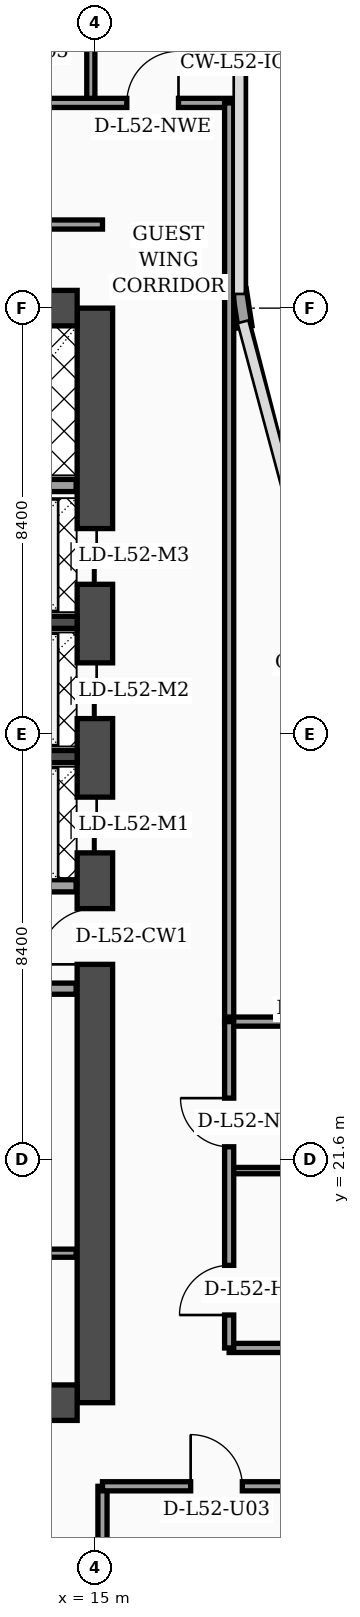
"""IFC4 building model, lengths in metres.
Left out: names, types, materials, properties, quantities, classifications, styles, units other than length and angle.
Written with IfcOpenShell. Run it as: python <this file> out.ifc"""

import sys

from ifc_helpers import new_model, si_unit, direction, frame, frame_2d, origin, place, context, subcontext, project, spatial, rectangle, extrude, element, fill, save


model = new_model("IFC4")
c1 = context("Model", 3, precision=1e-05, world=origin(), true_north=direction((0.0, 1.0)))
c2 = subcontext(c1, "Body", "Model", "MODEL_VIEW")
j1 = project(units=[si_unit("LENGTHUNIT", "METRE"), si_unit("PLANEANGLEUNIT", "RADIAN")], contexts=[c1])
p1 = place(None, origin())
s1 = spatial("IfcSite", under=j1, at=p1, CompositionType="ELEMENT")
p2 = place(p1, origin())
s2 = spatial("IfcBuilding", under=s1, at=p2, CompositionType="ELEMENT")
p3 = place(p2, frame((0.0, 0.0, 211.0)))
s3 = spatial("IfcBuildingStorey", under=s2, at=p3, CompositionType="ELEMENT", Elevation=211.0)
p4 = place(p3, frame((15.0, 16.8, 0.0), z_axis=(0.0, 0.0, 1.0), x_axis=(0.0, 1.0, 0.0)))
e1 = element("IfcWall", 1, at=p4, inside=s3, PredefinedType="SHEAR", context=c2, shape_type="SweptSolid", body=[
    extrude(rectangle(XDim=21.6, YDim=0.7, at=frame_2d((10.8, 0.0))), origin(), (0.0, 0.0, 1.0), 3.56),
])
p5 = place(p4, frame((8.65, 0.0, 0.0)))
e2 = element("IfcOpeningElement", 2, at=p5, cuts=e1, PredefinedType="OPENING", context=c2, shape_type="SweptSolid", body=[
    extrude(rectangle(XDim=1.1, YDim=2.2, at=frame_2d((0.55, 1.1))), frame((0.0, 0.36, 0.0), z_axis=(0.0, -1.0, 0.0), x_axis=(1.0, 0.0, 0.0)), (0.0, 0.0, 1.0), 0.72),
])
p6 = place(p4, frame((10.85, 0.0, 0.0)))
e3 = element("IfcOpeningElement", 3, at=p6, cuts=e1, PredefinedType="OPENING", context=c2, shape_type="SweptSolid", body=[
    extrude(rectangle(XDim=1.1, YDim=2.2, at=frame_2d((0.55, 1.1))), frame((0.0, 0.36, 0.0), z_axis=(0.0, -1.0, 0.0), x_axis=(1.0, 0.0, 0.0)), (0.0, 0.0, 1.0), 0.72),
])
p7 = place(p4, frame((13.5, 0.0, 0.0)))
e4 = element("IfcOpeningElement", 4, at=p7, cuts=e1, PredefinedType="OPENING", context=c2, shape_type="SweptSolid", body=[
    extrude(rectangle(XDim=1.1, YDim=2.2, at=frame_2d((0.55, 1.1))), frame((0.0, 0.36, 0.0), z_axis=(0.0, -1.0, 0.0), x_axis=(1.0, 0.0, 0.0)), (0.0, 0.0, 1.0), 0.72),
])
p8 = place(p4, frame((16.15, 0.0, 0.0)))
e5 = element("IfcOpeningElement", 5, at=p8, cuts=e1, PredefinedType="OPENING", context=c2, shape_type="SweptSolid", body=[
    extrude(rectangle(XDim=1.1, YDim=2.2, at=frame_2d((0.55, 1.1))), frame((0.0, 0.36, 0.0), z_axis=(0.0, -1.0, 0.0), x_axis=(1.0, 0.0, 0.0)), (0.0, 0.0, 1.0), 0.72),
])
for number, where, z_axis, x_axis in (
    (6, (4.55, 38.4, 0.0), (0.0, 0.0, 1.0), (1.0, 0.0, 0.0)),
    (7, (4.55, 16.8, 0.0), (0.0, 0.0, 1.0), (1.0, 0.0, 0.0)),
):
    element("IfcWall", number, at=place(p3, frame(where, z_axis=z_axis, x_axis=x_axis)), inside=s3, PredefinedType="SHEAR", context=c2, shape_type="SweptSolid", body=[
        extrude(rectangle(XDim=10.1, YDim=0.7, at=frame_2d((5.05, 0.0))), origin(), (0.0, 0.0, 1.0), 3.56),
    ])
for number, where, z_axis, x_axis in (
    (8, (12.18, 29.55, 0.0), (0.0, 0.0, 1.0), (1.0, 0.0, 0.0)),
    (9, (12.18, 32.2, 0.0), (0.0, 0.0, 1.0), (1.0, 0.0, 0.0)),
):
    element("IfcWall", number, at=place(p3, frame(where, z_axis=z_axis, x_axis=x_axis)), inside=s3, PredefinedType="SOLIDWALL", context=c2, shape_type="SweptSolid", body=[
        extrude(rectangle(XDim=2.47, YDim=0.24, at=frame_2d((1.235, 0.0))), origin(), (0.0, 0.0, 1.0), 3.56),
    ])
p9 = place(p3, frame((17.962, 38.03, 0.0), z_axis=(0.0, 0.0, 1.0), x_axis=(-0.15141125477, 0.988470855377, 0.0)))
e10 = element("IfcWall", 10, at=p9, inside=s3, PredefinedType="SOLIDWALL", context=c2, shape_type="SweptSolid", body=[
    extrude(rectangle(XDim=0.739, YDim=0.28, at=frame_2d((0.369, 0.0))), origin(), (0.0, 0.0, 1.0), 3.56),
])
p10 = place(p3, frame((9.68, 19.75, 0.0), z_axis=(0.0, 0.0, 1.0), x_axis=(1.0, 0.0, 0.0)))
e11 = element("IfcWall", 11, at=p10, inside=s3, PredefinedType="PARTITIONING", context=c2, shape_type="SweptSolid", body=[
    extrude(rectangle(XDim=4.95, YDim=0.16, at=frame_2d((2.475, 0.0))), origin(), (0.0, 0.0, 1.0), 3.56),
])
p11 = place(p10, frame((1.1, 0.0, 0.0)))
e12 = element("IfcOpeningElement", 12, at=p11, cuts=e11, PredefinedType="OPENING", context=c2, shape_type="SweptSolid", body=[
    extrude(rectangle(XDim=0.98, YDim=2.15, at=frame_2d((0.49, 1.075))), frame((0.0, 0.09, 0.0), z_axis=(0.0, -1.0, 0.0), x_axis=(1.0, 0.0, 0.0)), (0.0, 0.0, 1.0), 0.18),
])
p12 = place(p3, frame((9.68, 24.97, 0.0), z_axis=(0.0, 0.0, 1.0), x_axis=(1.0, 0.0, 0.0)))
e13 = element("IfcWall", 13, at=p12, inside=s3, PredefinedType="SOLIDWALL", context=c2, shape_type="SweptSolid", body=[
    extrude(rectangle(XDim=4.95, YDim=0.22, at=frame_2d((2.475, 0.0))), origin(), (0.0, 0.0, 1.0), 2.94),
])
p13 = place(p12, frame((0.9, 0.0, 0.0)))
e14 = element("IfcOpeningElement", 14, at=p13, cuts=e13, PredefinedType="OPENING", context=c2, shape_type="SweptSolid", body=[
    extrude(rectangle(XDim=0.98, YDim=2.15, at=frame_2d((0.49, 1.075))), frame((0.0, 0.12, 0.0), z_axis=(0.0, -1.0, 0.0), x_axis=(1.0, 0.0, 0.0)), (0.0, 0.0, 1.0), 0.24),
])
p14 = place(p3, frame((12.25, 27.0, 0.0), z_axis=(0.0, 0.0, 1.0), x_axis=(1.0, 0.0, 0.0)))
e15 = element("IfcWall", 15, at=p14, inside=s3, PredefinedType="SOLIDWALL", context=c2, shape_type="SweptSolid", body=[
    extrude(rectangle(XDim=2.38, YDim=0.24, at=frame_2d((1.19, 0.0))), origin(), (0.0, 0.0, 1.0), 3.56),
])
p15 = place(p3, frame((9.66, 34.9, 0.0), z_axis=(0.0, 0.0, 1.0), x_axis=(1.0, 0.0, 0.0)))
e16 = element("IfcWall", 16, at=p15, inside=s3, PredefinedType="SOLIDWALL", context=c2, shape_type="SweptSolid", body=[
    extrude(rectangle(XDim=4.97, YDim=0.24, at=frame_2d((2.485, 0.0))), origin(), (0.0, 0.0, 1.0), 3.56),
])
p16 = place(p3, frame((15.15, 2.44, 0.0), z_axis=(0.0, 0.0, 1.0), x_axis=(0.0, 1.0, 0.0)))
e17 = element("IfcWall", 17, at=p16, inside=s3, PredefinedType="PARTITIONING", context=c2, shape_type="SweptSolid", body=[
    extrude(rectangle(XDim=12.71, YDim=0.18, at=frame_2d((6.355, 0.0))), origin(), (0.0, 0.0, 1.0), 3.09),
])
p17 = place(p3, frame((15.15, 15.15, 0.0), z_axis=(0.0, 0.0, 1.0), x_axis=(1.0, 0.0, 0.0)))
e18 = element("IfcWall", 18, at=p17, inside=s3, PredefinedType="PARTITIONING", context=c2, shape_type="SweptSolid", body=[
    extrude(rectangle(XDim=6.45, YDim=0.18, at=frame_2d((3.225, 0.0))), origin(), (0.0, 0.0, 1.0), 2.59),
])
p18 = place(p17, frame((1.74, 0.0, 0.0)))
e19 = element("IfcOpeningElement", 19, at=p18, cuts=e18, PredefinedType="OPENING", context=c2, shape_type="SweptSolid", body=[
    extrude(rectangle(XDim=1.02, YDim=2.2, at=frame_2d((0.51, 1.1))), frame((0.0, 0.1, 0.0), z_axis=(0.0, -1.0, 0.0), x_axis=(1.0, 0.0, 0.0)), (0.0, 0.0, 1.0), 0.2),
])
p19 = place(p3, frame((14.92, 42.45, 0.0), z_axis=(0.0, 0.0, 1.0), x_axis=(0.0, 1.0, 0.0)))
e20 = element("IfcWall", 20, at=p19, inside=s3, PredefinedType="PARTITIONING", context=c2, shape_type="SweptSolid", body=[
    extrude(rectangle(XDim=5.35, YDim=0.16, at=frame_2d((2.675, 0.0))), origin(), (0.0, 0.0, 1.0), 3.09),
])
p20 = place(p3, frame((0.08, 42.45, 0.0), z_axis=(0.0, 0.0, 1.0), x_axis=(1.0, 0.0, 0.0)))
e21 = element("IfcWall", 21, at=p20, inside=s3, PredefinedType="PARTITIONING", context=c2, shape_type="SweptSolid", body=[
    extrude(rectangle(XDim=17.77, YDim=0.18, at=frame_2d((8.885, 0.0))), origin(), (0.0, 0.0, 1.0), 2.94),
])
p21 = place(p20, frame((0.9, 0.0, 0.0)))
e22 = element("IfcOpeningElement", 22, at=p21, cuts=e21, PredefinedType="OPENING", context=c2, shape_type="SweptSolid", body=[
    extrude(rectangle(XDim=1.02, YDim=2.2, at=frame_2d((0.51, 1.1))), frame((0.0, 0.1, 0.0), z_axis=(0.0, -1.0, 0.0), x_axis=(1.0, 0.0, 0.0)), (0.0, 0.0, 1.0), 0.2),
])
p22 = place(p20, frame((4.45, 0.0, 0.0)))
e23 = element("IfcOpeningElement", 23, at=p22, cuts=e21, PredefinedType="OPENING", context=c2, shape_type="SweptSolid", body=[
    extrude(rectangle(XDim=1.02, YDim=2.2, at=frame_2d((0.51, 1.1))), frame((0.0, 0.1, 0.0), z_axis=(0.0, -1.0, 0.0), x_axis=(1.0, 0.0, 0.0)), (0.0, 0.0, 1.0), 0.2),
])
p23 = place(p20, frame((10.33, 0.0, 0.0)))
e24 = element("IfcOpeningElement", 24, at=p23, cuts=e21, PredefinedType="OPENING", context=c2, shape_type="SweptSolid", body=[
    extrude(rectangle(XDim=1.02, YDim=2.2, at=frame_2d((0.51, 1.1))), frame((0.0, 0.1, 0.0), z_axis=(0.0, -1.0, 0.0), x_axis=(1.0, 0.0, 0.0)), (0.0, 0.0, 1.0), 0.2),
])
p24 = place(p20, frame((15.55, 0.0, 0.0)))
e25 = element("IfcOpeningElement", 25, at=p24, cuts=e21, PredefinedType="OPENING", context=c2, shape_type="SweptSolid", body=[
    extrude(rectangle(XDim=1.02, YDim=2.2, at=frame_2d((0.51, 1.1))), frame((0.0, 0.1, 0.0), z_axis=(0.0, -1.0, 0.0), x_axis=(1.0, 0.0, 0.0)), (0.0, 0.0, 1.0), 0.2),
])
p25 = place(p3, frame((17.65, 24.3, 0.0), z_axis=(0.0, 0.0, 1.0), x_axis=(0.0, 1.0, 0.0)))
e26 = element("IfcWall", 26, at=p25, inside=s3, PredefinedType="PARTITIONING", context=c2, shape_type="SweptSolid", body=[
    extrude(rectangle(XDim=18.15, YDim=0.18, at=frame_2d((9.075, 0.0))), origin(), (0.0, 0.0, 1.0), 2.94),
])
p26 = place(p3, frame((3.83, 40.05, 0.0), z_axis=(0.0, 0.0, 1.0), x_axis=(1.0, 0.0, 0.0)))
e27 = element("IfcWall", 27, at=p26, inside=s3, PredefinedType="PARTITIONING", context=c2, shape_type="SweptSolid", body=[
    extrude(rectangle(XDim=11.32, YDim=0.18, at=frame_2d((5.66, 0.0))), origin(), (0.0, 0.0, 1.0), 2.94),
])
p27 = place(p3, frame((17.65, 17.88, 0.0), z_axis=(0.0, 0.0, 1.0), x_axis=(1.0, 0.0, 0.0)))
e28 = element("IfcWall", 28, at=p27, inside=s3, PredefinedType="PARTITIONING", context=c2, shape_type="SweptSolid", body=[
    extrude(rectangle(XDim=3.9, YDim=0.18, at=frame_2d((1.95, 0.0))), origin(), (0.0, 0.0, 1.0), 3.56),
])
p28 = place(p3, frame((17.65, 21.38, 0.0), z_axis=(0.0, 0.0, 1.0), x_axis=(1.0, 0.0, 0.0)))
e29 = element("IfcWall", 29, at=p28, inside=s3, PredefinedType="PARTITIONING", context=c2, shape_type="SweptSolid", body=[
    extrude(rectangle(XDim=3.9, YDim=0.125, at=frame_2d((1.95, 0.0))), origin(), (0.0, 0.0, 1.0), 3.56),
])
p29 = place(p3, frame((17.65, 24.32, 0.0), z_axis=(0.0, 0.0, 1.0), x_axis=(1.0, 0.0, 0.0)))
e30 = element("IfcWall", 30, at=p29, inside=s3, PredefinedType="PARTITIONING", context=c2, shape_type="SweptSolid", body=[
    extrude(rectangle(XDim=3.95, YDim=0.18, at=frame_2d((1.975, 0.0))), origin(), (0.0, 0.0, 1.0), 3.56),
])
p30 = place(p3, frame((17.65, 17.88, 0.0), z_axis=(0.0, 0.0, 1.0), x_axis=(0.0, 1.0, 0.0)))
e31 = element("IfcWall", 31, at=p30, inside=s3, PredefinedType="PARTITIONING", context=c2, shape_type="SweptSolid", body=[
    extrude(rectangle(XDim=6.44, YDim=0.18, at=frame_2d((3.22, 0.0))), origin(), (0.0, 0.0, 1.0), 3.56),
])
p31 = place(p30, frame((0.65, 0.0, 0.0)))
e32 = element("IfcOpeningElement", 32, at=p31, cuts=e31, PredefinedType="OPENING", context=c2, shape_type="SweptSolid", body=[
    extrude(rectangle(XDim=0.98, YDim=2.15, at=frame_2d((0.49, 1.075))), frame((0.0, 0.1, 0.0), z_axis=(0.0, -1.0, 0.0), x_axis=(1.0, 0.0, 0.0)), (0.0, 0.0, 1.0), 0.2),
])
p32 = place(p30, frame((3.97, 0.0, 0.0)))
e33 = element("IfcOpeningElement", 33, at=p32, cuts=e31, PredefinedType="OPENING", context=c2, shape_type="SweptSolid", body=[
    extrude(rectangle(XDim=0.96, YDim=2.2, at=frame_2d((0.48, 1.1))), frame((0.0, 0.1, 0.0), z_axis=(0.0, -1.0, 0.0), x_axis=(1.0, 0.0, 0.0)), (0.0, 0.0, 1.0), 0.2),
])
p33 = place(p18, origin())
e34 = element("IfcDoor", 34, at=p33, inside=s3, OperationType="SINGLE_SWING_LEFT", PredefinedType="DOOR", context=c2, shape_type="SweptSolid", body=[
    extrude(rectangle(XDim=1.02, YDim=2.2, at=frame_2d((0.51, 1.1))), frame((0.0, 0.025, 0.0), z_axis=(0.0, -1.0, 0.0), x_axis=(1.0, 0.0, 0.0)), (0.0, 0.0, 1.0), 0.05),
])
fill(e19, e34)
p34 = place(p24, origin())
e35 = element("IfcDoor", 35, at=p34, inside=s3, OperationType="SINGLE_SWING_RIGHT", PredefinedType="DOOR", context=c2, shape_type="SweptSolid", body=[
    extrude(rectangle(XDim=1.02, YDim=2.2, at=frame_2d((0.51, 1.1))), frame((0.0, 0.025, 0.0), z_axis=(0.0, -1.0, 0.0), x_axis=(1.0, 0.0, 0.0)), (0.0, 0.0, 1.0), 0.05),
])
fill(e25, e35)
p35 = place(p31, origin())
e36 = element("IfcDoor", 36, at=p35, inside=s3, OperationType="SINGLE_SWING_LEFT", PredefinedType="DOOR", context=c2, shape_type="SweptSolid", body=[
    extrude(rectangle(XDim=0.98, YDim=2.15, at=frame_2d((0.49, 1.075))), frame((0.0, 0.025, 0.0), z_axis=(0.0, -1.0, 0.0), x_axis=(1.0, 0.0, 0.0)), (0.0, 0.0, 1.0), 0.05),
])
fill(e32, e36)
p36 = place(p32, origin())
e37 = element("IfcDoor", 37, at=p36, inside=s3, OperationType="SINGLE_SWING_RIGHT", PredefinedType="DOOR", context=c2, shape_type="SweptSolid", body=[
    extrude(rectangle(XDim=0.96, YDim=2.2, at=frame_2d((0.48, 1.1))), frame((0.0, 0.025, 0.0), z_axis=(0.0, -1.0, 0.0), x_axis=(1.0, 0.0, 0.0)), (0.0, 0.0, 1.0), 0.05),
])
fill(e33, e37)
p37 = place(p5, origin())
e38 = element("IfcDoor", 38, at=p37, inside=s3, OperationType="SINGLE_SWING_LEFT", PredefinedType="DOOR", context=c2, shape_type="SweptSolid", body=[
    extrude(rectangle(XDim=1.1, YDim=2.2, at=frame_2d((0.55, 1.1))), frame((0.0, 0.025, 0.0), z_axis=(0.0, -1.0, 0.0), x_axis=(1.0, 0.0, 0.0)), (0.0, 0.0, 1.0), 0.05),
])
fill(e2, e38)
p38 = place(p6, origin())
e39 = element("IfcDoor", 39, at=p38, inside=s3, OperationType="DOUBLE_DOOR_SLIDING", PredefinedType="DOOR", context=c2, shape_type="SweptSolid", body=[
    extrude(rectangle(XDim=1.1, YDim=2.2, at=frame_2d((0.55, 1.1))), frame((0.0, 0.025, 0.0), z_axis=(0.0, -1.0, 0.0), x_axis=(1.0, 0.0, 0.0)), (0.0, 0.0, 1.0), 0.05),
])
fill(e3, e39)
p39 = place(p7, origin())
e40 = element("IfcDoor", 40, at=p39, inside=s3, OperationType="DOUBLE_DOOR_SLIDING", PredefinedType="DOOR", context=c2, shape_type="SweptSolid", body=[
    extrude(rectangle(XDim=1.1, YDim=2.2, at=frame_2d((0.55, 1.1))), frame((0.0, 0.025, 0.0), z_axis=(0.0, -1.0, 0.0), x_axis=(1.0, 0.0, 0.0)), (0.0, 0.0, 1.0), 0.05),
])
fill(e4, e40)
p40 = place(p8, origin())
e41 = element("IfcDoor", 41, at=p40, inside=s3, OperationType="DOUBLE_DOOR_SLIDING", PredefinedType="DOOR", context=c2, shape_type="SweptSolid", body=[
    extrude(rectangle(XDim=1.1, YDim=2.2, at=frame_2d((0.55, 1.1))), frame((0.0, 0.025, 0.0), z_axis=(0.0, -1.0, 0.0), x_axis=(1.0, 0.0, 0.0)), (0.0, 0.0, 1.0), 0.05),
])
fill(e5, e41)
save(model, sys.argv[1])
